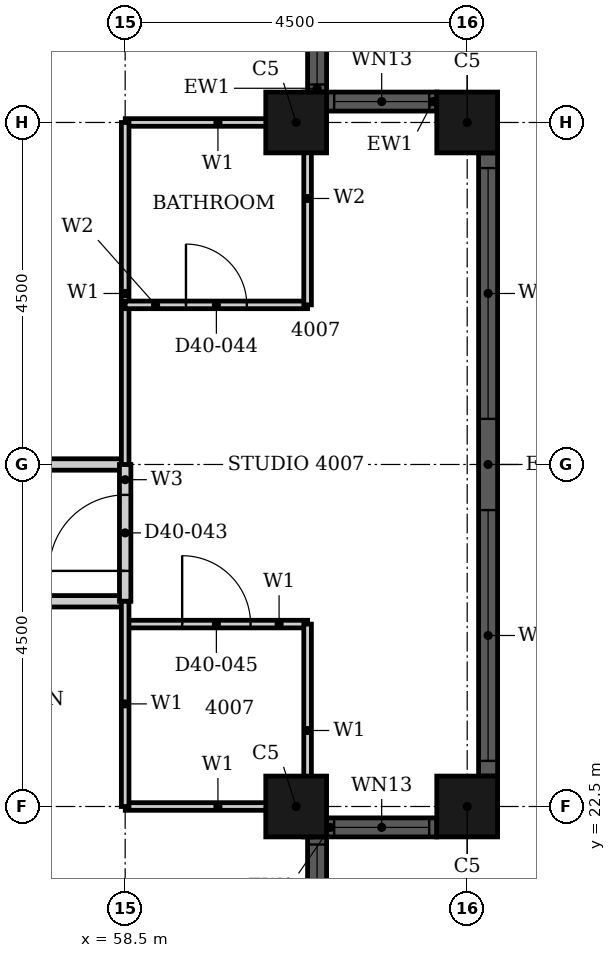
"""IFC4 building model, lengths in metres.
Left out: names, types, materials, properties, quantities, classifications, styles, units other than length and angle.
Written with IfcOpenShell. Run it as: python <this file> out.ifc"""

import sys

from ifc_helpers import new_model, si_unit, direction, frame, frame_2d, origin, origin_2d, place, context, subcontext, project, spatial, rectangle, hollow_rectangle, extrude, element, fill, save


model = new_model("IFC4")
c1 = context("Model", 3, precision=1e-05, world=origin(), true_north=direction((0.0, 1.0)))
c2 = subcontext(c1, "Body", "Model", "MODEL_VIEW")
j1 = project(units=[si_unit("LENGTHUNIT", "METRE"), si_unit("PLANEANGLEUNIT", "RADIAN")], contexts=[c1])
p1 = place(None, origin())
s1 = spatial("IfcSite", under=j1, at=p1, CompositionType="ELEMENT")
p2 = place(p1, origin())
s2 = spatial("IfcBuilding", under=s1, at=p2, CompositionType="ELEMENT")
p3 = place(p2, frame((0.0, 0.0, 161.7)))
s3 = spatial("IfcBuildingStorey", under=s2, at=p3, CompositionType="ELEMENT", Elevation=161.7)
for number, where, z_axis, x_axis in (
    (1, (60.75, 22.5, 0.0), (0.0, 0.0, 1.0), (1.0, 0.0, 0.0)),
    (2, (63.0, 22.5, 0.0), (0.0, 0.0, 1.0), (1.0, 0.0, 0.0)),
    (3, (63.0, 31.5, 0.0), (0.0, 0.0, 1.0), (1.0, 0.0, 0.0)),
    (4, (60.75, 31.5, 0.0), (0.0, 0.0, 1.0), (1.0, 0.0, 0.0)),
):
    element("IfcColumn", number, at=place(p3, frame(where, z_axis=z_axis, x_axis=x_axis)), inside=s3, PredefinedType="COLUMN", context=c2, shape_type="SweptSolid", body=[
        extrude(hollow_rectangle(XDim=0.8, YDim=0.8, WallThickness=0.025, at=origin_2d()), origin(), (0.0, 0.0, 1.0), 3.7),
    ])
p4 = place(p3, frame((61.025, 20.65, 0.0), z_axis=(0.0, 0.0, 1.0), x_axis=(0.0, 1.0, 0.0)))
e5 = element("IfcWall", 5, at=p4, inside=s3, PredefinedType="SOLIDWALL", context=c2, shape_type="SweptSolid", body=[
    extrude(rectangle(XDim=1.45, YDim=0.25, at=frame_2d((0.725, 0.0))), origin(), (0.0, 0.0, 1.0), 3.7),
])
p5 = place(p4, frame((0.1, 0.0, 0.9)))
e6 = element("IfcOpeningElement", 6, at=p5, cuts=e5, PredefinedType="OPENING", context=c2, shape_type="SweptSolid", body=[
    extrude(rectangle(XDim=1.25, YDim=1.85, at=frame_2d((0.625, 0.925))), frame((0.0, 0.135, 0.0), z_axis=(0.0, -1.0, 0.0), x_axis=(1.0, 0.0, 0.0)), (0.0, 0.0, 1.0), 0.27),
])
p6 = place(p3, frame((61.15, 22.225, 0.0), z_axis=(0.0, 0.0, 1.0), x_axis=(1.0, 0.0, 0.0)))
e7 = element("IfcWall", 7, at=p6, inside=s3, PredefinedType="SOLIDWALL", context=c2, shape_type="SweptSolid", body=[
    extrude(rectangle(XDim=1.45, YDim=0.25, at=frame_2d((0.725, 0.0))), origin(), (0.0, 0.0, 1.0), 3.7),
])
p7 = place(p6, frame((0.1, 0.0, 0.9)))
e8 = element("IfcOpeningElement", 8, at=p7, cuts=e7, PredefinedType="OPENING", context=c2, shape_type="SweptSolid", body=[
    extrude(rectangle(XDim=1.25, YDim=1.85, at=frame_2d((0.625, 0.925))), frame((0.0, 0.135, 0.0), z_axis=(0.0, -1.0, 0.0), x_axis=(1.0, 0.0, 0.0)), (0.0, 0.0, 1.0), 0.27),
])
p8 = place(p3, frame((63.275, 22.9, 0.0), z_axis=(0.0, 0.0, 1.0), x_axis=(0.0, 1.0, 0.0)))
e9 = element("IfcWall", 9, at=p8, inside=s3, PredefinedType="SOLIDWALL", context=c2, shape_type="SweptSolid", body=[
    extrude(rectangle(XDim=8.2, YDim=0.25, at=frame_2d((4.1, 0.0))), origin(), (0.0, 0.0, 1.0), 3.7),
])
p9 = place(p8, frame((0.2, 0.0, 0.45)))
e10 = element("IfcOpeningElement", 10, at=p9, cuts=e9, PredefinedType="OPENING", context=c2, shape_type="SweptSolid", body=[
    extrude(rectangle(XDim=3.3, YDim=2.3, at=frame_2d((1.65, 1.15))), frame((0.0, 0.135, 0.0), z_axis=(0.0, -1.0, 0.0), x_axis=(1.0, 0.0, 0.0)), (0.0, 0.0, 1.0), 0.27),
])
p10 = place(p8, frame((4.7, 0.0, 0.45)))
e11 = element("IfcOpeningElement", 11, at=p10, cuts=e9, PredefinedType="OPENING", context=c2, shape_type="SweptSolid", body=[
    extrude(rectangle(XDim=3.3, YDim=2.3, at=frame_2d((1.65, 1.15))), frame((0.0, 0.135, 0.0), z_axis=(0.0, -1.0, 0.0), x_axis=(1.0, 0.0, 0.0)), (0.0, 0.0, 1.0), 0.27),
])
p11 = place(p3, frame((62.6, 31.775, 0.0), z_axis=(0.0, 0.0, 1.0), x_axis=(-1.0, 0.0, 0.0)))
e12 = element("IfcWall", 12, at=p11, inside=s3, PredefinedType="SOLIDWALL", context=c2, shape_type="SweptSolid", body=[
    extrude(rectangle(XDim=1.45, YDim=0.25, at=frame_2d((0.725, 0.0))), origin(), (0.0, 0.0, 1.0), 3.7),
])
p12 = place(p11, frame((0.1, 0.0, 0.9)))
e13 = element("IfcOpeningElement", 13, at=p12, cuts=e12, PredefinedType="OPENING", context=c2, shape_type="SweptSolid", body=[
    extrude(rectangle(XDim=1.25, YDim=1.85, at=frame_2d((0.625, 0.925))), frame((0.0, 0.135, 0.0), z_axis=(0.0, -1.0, 0.0), x_axis=(1.0, 0.0, 0.0)), (0.0, 0.0, 1.0), 0.27),
])
p13 = place(p3, frame((61.025, 31.9, 0.0), z_axis=(0.0, 0.0, 1.0), x_axis=(0.0, 1.0, 0.0)))
e14 = element("IfcWall", 14, at=p13, inside=s3, PredefinedType="SOLIDWALL", context=c2, shape_type="SweptSolid", body=[
    extrude(rectangle(XDim=1.45, YDim=0.25, at=frame_2d((0.725, 0.0))), origin(), (0.0, 0.0, 1.0), 3.7),
])
p14 = place(p13, frame((0.1, 0.0, 0.9)))
e15 = element("IfcOpeningElement", 15, at=p14, cuts=e14, PredefinedType="OPENING", context=c2, shape_type="SweptSolid", body=[
    extrude(rectangle(XDim=1.25, YDim=1.85, at=frame_2d((0.625, 0.925))), frame((0.0, 0.135, 0.0), z_axis=(0.0, -1.0, 0.0), x_axis=(1.0, 0.0, 0.0)), (0.0, 0.0, 1.0), 0.27),
])
p15 = place(p3, frame((46.801, 25.2, 0.0), z_axis=(0.0, 0.0, 1.0), x_axis=(1.0, 0.0, 0.0)))
e16 = element("IfcWall", 16, at=p15, inside=s3, PredefinedType="PARTITIONING", context=c2, shape_type="SweptSolid", body=[
    extrude(rectangle(XDim=11.699, YDim=0.15, at=frame_2d((5.85, 0.0))), origin(), (0.0, 0.0, 1.0), 3.4),
])
p16 = place(p15, frame((6.698, 0.0, 0.0)))
e17 = element("IfcOpeningElement", 17, at=p16, cuts=e16, PredefinedType="OPENING", context=c2, shape_type="SweptSolid", body=[
    extrude(rectangle(XDim=1.0, YDim=2.1, at=frame_2d((0.5, 1.05))), frame((0.0, 0.085, 0.0), z_axis=(0.0, -1.0, 0.0), x_axis=(1.0, 0.0, 0.0)), (0.0, 0.0, 1.0), 0.17),
])
p17 = place(p3, frame((45.0, 27.0, 0.0), z_axis=(0.0, 0.0, 1.0), x_axis=(1.0, 0.0, 0.0)))
e18 = element("IfcWall", 18, at=p17, inside=s3, PredefinedType="PARTITIONING", context=c2, shape_type="SweptSolid", body=[
    extrude(rectangle(XDim=13.5, YDim=0.15, at=frame_2d((6.75, 0.0))), origin(), (0.0, 0.0, 1.0), 2.68),
])
p18 = place(p17, frame((7.15, 0.0, 0.0)))
e19 = element("IfcOpeningElement", 19, at=p18, cuts=e18, PredefinedType="OPENING", context=c2, shape_type="SweptSolid", body=[
    extrude(rectangle(XDim=1.0, YDim=2.1, at=frame_2d((0.5, 1.05))), frame((0.0, 0.085, 0.0), z_axis=(0.0, -1.0, 0.0), x_axis=(1.0, 0.0, 0.0)), (0.0, 0.0, 1.0), 0.17),
])
p19 = place(p3, frame((58.5, 25.2, 0.0), z_axis=(0.0, 0.0, 1.0), x_axis=(0.0, 1.0, 0.0)))
e20 = element("IfcWall", 20, at=p19, inside=s3, PredefinedType="PARTITIONING", context=c2, shape_type="SweptSolid", body=[
    extrude(rectangle(XDim=1.8, YDim=0.15, at=frame_2d((0.9, 0.0))), origin(), (0.0, 0.0, 1.0), 3.4),
])
p20 = place(p19, frame((0.4, 0.0, 0.0)))
e21 = element("IfcOpeningElement", 21, at=p20, cuts=e20, PredefinedType="OPENING", context=c2, shape_type="SweptSolid", body=[
    extrude(rectangle(XDim=1.0, YDim=2.2, at=frame_2d((0.5, 1.1))), frame((0.0, 0.085, 0.0), z_axis=(0.0, -1.0, 0.0), x_axis=(1.0, 0.0, 0.0)), (0.0, 0.0, 1.0), 0.17),
])
p21 = place(p3, frame((58.501, 22.5, 0.0), z_axis=(0.0, 0.0, 1.0), x_axis=(1.0, 0.0, 0.0)))
e22 = element("IfcWall", 22, at=p21, inside=s3, PredefinedType="PARTITIONING", context=c2, shape_type="SweptSolid", body=[
    extrude(rectangle(XDim=2.439, YDim=0.1, at=frame_2d((1.219, 0.0))), origin(), (0.0, 0.0, 1.0), 2.68),
])
p22 = place(p3, frame((58.5, 24.9, 0.0), z_axis=(0.0, 0.0, 1.0), x_axis=(1.0, 0.0, 0.0)))
e23 = element("IfcWall", 23, at=p22, inside=s3, PredefinedType="PARTITIONING", context=c2, shape_type="SweptSolid", body=[
    extrude(rectangle(XDim=2.4, YDim=0.1, at=frame_2d((1.2, 0.0))), origin(), (0.0, 0.0, 1.0), 3.4),
])
p23 = place(p22, frame((0.75, 0.0, 0.0)))
e24 = element("IfcOpeningElement", 24, at=p23, cuts=e23, PredefinedType="OPENING", context=c2, shape_type="SweptSolid", body=[
    extrude(rectangle(XDim=0.9, YDim=2.1, at=frame_2d((0.45, 1.05))), frame((0.0, 0.06, 0.0), z_axis=(0.0, -1.0, 0.0), x_axis=(1.0, 0.0, 0.0)), (0.0, 0.0, 1.0), 0.12),
])
p24 = place(p3, frame((58.501, 31.5, 0.0), z_axis=(0.0, 0.0, 1.0), x_axis=(1.0, 0.0, 0.0)))
e25 = element("IfcWall", 25, at=p24, inside=s3, PredefinedType="PARTITIONING", context=c2, shape_type="SweptSolid", body=[
    extrude(rectangle(XDim=2.439, YDim=0.1, at=frame_2d((1.219, 0.0))), origin(), (0.0, 0.0, 1.0), 2.68),
])
p25 = place(p3, frame((58.5, 27.0, 0.0), z_axis=(0.0, 0.0, 1.0), x_axis=(0.0, 1.0, 0.0)))
e26 = element("IfcWall", 26, at=p25, inside=s3, PredefinedType="PARTITIONING", context=c2, shape_type="SweptSolid", body=[
    extrude(rectangle(XDim=4.5, YDim=0.1, at=frame_2d((2.25, 0.0))), origin(), (0.0, 0.0, 1.0), 3.4),
])
p26 = place(p3, frame((58.5, 22.5, 0.0), z_axis=(0.0, 0.0, 1.0), x_axis=(0.0, 1.0, 0.0)))
e27 = element("IfcWall", 27, at=p26, inside=s3, PredefinedType="PARTITIONING", context=c2, shape_type="SweptSolid", body=[
    extrude(rectangle(XDim=2.7, YDim=0.1, at=frame_2d((1.35, 0.0))), origin(), (0.0, 0.0, 1.0), 3.4),
])
p27 = place(p3, frame((60.9, 22.1, 0.0), z_axis=(0.0, 0.0, 1.0), x_axis=(0.0, 1.0, 0.0)))
e28 = element("IfcWall", 28, at=p27, inside=s3, PredefinedType="PARTITIONING", context=c2, shape_type="SweptSolid", body=[
    extrude(rectangle(XDim=2.8, YDim=0.1, at=frame_2d((1.4, 0.0))), origin(), (0.0, 0.0, 1.0), 3.4),
])
p28 = place(p3, frame((58.5, 29.1, 0.0), z_axis=(0.0, 0.0, 1.0), x_axis=(1.0, 0.0, 0.0)))
e29 = element("IfcWall", 29, at=p28, inside=s3, PredefinedType="PARTITIONING", context=c2, shape_type="SweptSolid", body=[
    extrude(rectangle(XDim=2.4, YDim=0.1, at=frame_2d((1.2, 0.0))), origin(), (0.0, 0.0, 1.0), 3.4),
])
p29 = place(p28, frame((0.8, 0.0, 0.0)))
e30 = element("IfcOpeningElement", 30, at=p29, cuts=e29, PredefinedType="OPENING", context=c2, shape_type="SweptSolid", body=[
    extrude(rectangle(XDim=0.8, YDim=2.1, at=frame_2d((0.4, 1.05))), frame((0.0, 0.06, 0.0), z_axis=(0.0, -1.0, 0.0), x_axis=(1.0, 0.0, 0.0)), (0.0, 0.0, 1.0), 0.12),
])
p30 = place(p3, frame((60.9, 29.1, 0.0), z_axis=(0.0, 0.0, 1.0), x_axis=(0.0, 1.0, 0.0)))
e31 = element("IfcWall", 31, at=p30, inside=s3, PredefinedType="PARTITIONING", context=c2, shape_type="SweptSolid", body=[
    extrude(rectangle(XDim=2.8, YDim=0.1, at=frame_2d((1.4, 0.0))), origin(), (0.0, 0.0, 1.0), 3.4),
])
p31 = place(p5, origin())
e32 = element("IfcWindow", 32, at=p31, inside=s3, PartitioningType="SINGLE_PANEL", PredefinedType="WINDOW", context=c2, shape_type="SweptSolid", body=[
    extrude(rectangle(XDim=1.25, YDim=1.85, at=frame_2d((0.625, 0.925))), frame((0.0, 0.03, 0.0), z_axis=(0.0, -1.0, 0.0), x_axis=(1.0, 0.0, 0.0)), (0.0, 0.0, 1.0), 0.06),
])
fill(e6, e32)
p32 = place(p7, origin())
e33 = element("IfcWindow", 33, at=p32, inside=s3, PartitioningType="SINGLE_PANEL", PredefinedType="WINDOW", context=c2, shape_type="SweptSolid", body=[
    extrude(rectangle(XDim=1.25, YDim=1.85, at=frame_2d((0.625, 0.925))), frame((0.0, 0.03, 0.0), z_axis=(0.0, -1.0, 0.0), x_axis=(1.0, 0.0, 0.0)), (0.0, 0.0, 1.0), 0.06),
])
fill(e8, e33)
p33 = place(p9, origin())
e34 = element("IfcWindow", 34, at=p33, inside=s3, PartitioningType="SINGLE_PANEL", PredefinedType="WINDOW", context=c2, shape_type="SweptSolid", body=[
    extrude(rectangle(XDim=3.3, YDim=2.3, at=frame_2d((1.65, 1.15))), frame((0.0, 0.03, 0.0), z_axis=(0.0, -1.0, 0.0), x_axis=(1.0, 0.0, 0.0)), (0.0, 0.0, 1.0), 0.06),
])
fill(e10, e34)
p34 = place(p10, origin())
e35 = element("IfcWindow", 35, at=p34, inside=s3, PartitioningType="SINGLE_PANEL", PredefinedType="WINDOW", context=c2, shape_type="SweptSolid", body=[
    extrude(rectangle(XDim=3.3, YDim=2.3, at=frame_2d((1.65, 1.15))), frame((0.0, 0.03, 0.0), z_axis=(0.0, -1.0, 0.0), x_axis=(1.0, 0.0, 0.0)), (0.0, 0.0, 1.0), 0.06),
])
fill(e11, e35)
p35 = place(p12, origin())
e36 = element("IfcWindow", 36, at=p35, inside=s3, PartitioningType="SINGLE_PANEL", PredefinedType="WINDOW", context=c2, shape_type="SweptSolid", body=[
    extrude(rectangle(XDim=1.25, YDim=1.85, at=frame_2d((0.625, 0.925))), frame((0.0, 0.03, 0.0), z_axis=(0.0, -1.0, 0.0), x_axis=(1.0, 0.0, 0.0)), (0.0, 0.0, 1.0), 0.06),
])
fill(e13, e36)
p36 = place(p14, origin())
e37 = element("IfcWindow", 37, at=p36, inside=s3, PartitioningType="SINGLE_PANEL", PredefinedType="WINDOW", context=c2, shape_type="SweptSolid", body=[
    extrude(rectangle(XDim=1.25, YDim=1.85, at=frame_2d((0.625, 0.925))), frame((0.0, 0.03, 0.0), z_axis=(0.0, -1.0, 0.0), x_axis=(1.0, 0.0, 0.0)), (0.0, 0.0, 1.0), 0.06),
])
fill(e15, e37)
p37 = place(p20, origin())
e38 = element("IfcDoor", 38, at=p37, inside=s3, OperationType="SINGLE_SWING_RIGHT", PredefinedType="DOOR", context=c2, shape_type="SweptSolid", body=[
    extrude(rectangle(XDim=1.0, YDim=2.2, at=frame_2d((0.5, 1.1))), frame((0.0, 0.025, 0.0), z_axis=(0.0, -1.0, 0.0), x_axis=(1.0, 0.0, 0.0)), (0.0, 0.0, 1.0), 0.05),
])
fill(e21, e38)
p38 = place(p29, origin())
e39 = element("IfcDoor", 39, at=p38, inside=s3, OperationType="SINGLE_SWING_RIGHT", PredefinedType="DOOR", context=c2, shape_type="SweptSolid", body=[
    extrude(rectangle(XDim=0.8, YDim=2.1, at=frame_2d((0.4, 1.05))), frame((0.0, 0.025, 0.0), z_axis=(0.0, -1.0, 0.0), x_axis=(1.0, 0.0, 0.0)), (0.0, 0.0, 1.0), 0.05),
])
fill(e30, e39)
p39 = place(p23, origin())
e40 = element("IfcDoor", 40, at=p39, inside=s3, OperationType="SINGLE_SWING_LEFT", PredefinedType="DOOR", context=c2, shape_type="SweptSolid", body=[
    extrude(rectangle(XDim=0.9, YDim=2.1, at=frame_2d((0.45, 1.05))), frame((0.0, 0.025, 0.0), z_axis=(0.0, -1.0, 0.0), x_axis=(1.0, 0.0, 0.0)), (0.0, 0.0, 1.0), 0.05),
])
fill(e24, e40)
save(model, sys.argv[1])
